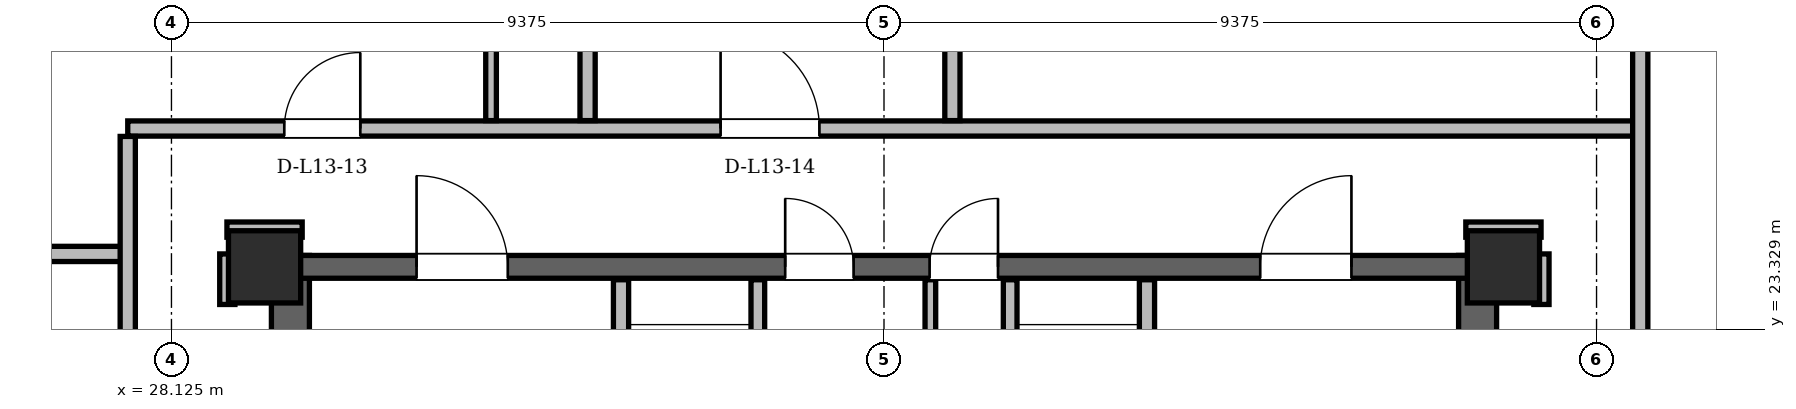
"""IFC4 building model, lengths in metres.
Left out: names, types, materials, properties, quantities, classifications, styles, units other than length and angle.
Written with IfcOpenShell. Run it as: python <this file> out.ifc"""

import sys

from ifc_helpers import new_model, si_unit, direction, frame, frame_2d, origin, origin_2d, place, context, subcontext, project, spatial, rectangle, hollow_rectangle, extrude, element, fill, save


model = new_model("IFC4")
c1 = context("Model", 3, precision=1e-05, world=origin(), true_north=direction((0.0, 1.0)))
c2 = subcontext(c1, "Body", "Model", "MODEL_VIEW")
j1 = project(units=[si_unit("LENGTHUNIT", "METRE"), si_unit("PLANEANGLEUNIT", "RADIAN")], contexts=[c1])
p1 = place(None, origin())
s1 = spatial("IfcSite", under=j1, at=p1, CompositionType="ELEMENT")
p2 = place(p1, origin())
s2 = spatial("IfcBuilding", under=s1, at=p2, CompositionType="ELEMENT")
p3 = place(p2, frame((0.0, 0.0, 52.5)))
s3 = spatial("IfcBuildingStorey", under=s2, at=p3, CompositionType="ELEMENT", Elevation=52.5)
for number, where, z_axis, x_axis in (
    (1, (45.65, 24.15, 0.0), (0.0, 0.0, 1.0), (1.0, 0.0, 0.0)),
    (2, (29.35, 24.15, 0.0), (0.0, 0.0, 1.0), (1.0, 0.0, 0.0)),
):
    element("IfcColumn", number, at=place(p3, frame(where, z_axis=z_axis, x_axis=x_axis)), inside=s3, PredefinedType="COLUMN", context=c2, shape_type="SweptSolid", body=[
        extrude(hollow_rectangle(XDim=0.95, YDim=0.95, WallThickness=0.08, at=origin_2d()), origin(), (0.0, 0.0, 1.0), 3.6),
    ])
for number, where, z_axis, x_axis in (
    (3, (29.69, 11.0, 0.0), (0.0, 0.0, 1.0), (0.0, 1.0, 0.0)),
    (4, (45.31, 11.0, 0.0), (0.0, 0.0, 1.0), (0.0, 1.0, 0.0)),
):
    element("IfcWall", number, at=place(p3, frame(where, z_axis=z_axis, x_axis=x_axis)), inside=s3, PredefinedType="SHEAR", context=c2, shape_type="SweptSolid", body=[
        extrude(rectangle(XDim=13.3, YDim=0.5, at=frame_2d((6.65, 0.0))), origin(), (0.0, 0.0, 1.0), 3.36),
    ])
p4 = place(p3, frame((29.65, 24.15, 0.0), z_axis=(0.0, 0.0, 1.0), x_axis=(1.0, 0.0, 0.0)))
e5 = element("IfcWall", 5, at=p4, inside=s3, PredefinedType="SHEAR", context=c2, shape_type="SweptSolid", body=[
    extrude(rectangle(XDim=15.7, YDim=0.3, at=frame_2d((7.85, 0.0))), origin(), (0.0, 0.0, 1.0), 3.36),
])
p5 = place(p4, frame((1.7, 0.0, 0.0)))
e6 = element("IfcOpeningElement", 6, at=p5, cuts=e5, PredefinedType="OPENING", context=c2, shape_type="SweptSolid", body=[
    extrude(rectangle(XDim=1.2, YDim=2.2, at=frame_2d((0.6, 1.1))), frame((0.0, 0.15, 0.0), z_axis=(0.0, -1.0, 0.0), x_axis=(1.0, 0.0, 0.0)), (0.0, 0.0, 1.0), 0.3),
])
p6 = place(p4, frame((12.8, 0.0, 0.0)))
e7 = element("IfcOpeningElement", 7, at=p6, cuts=e5, PredefinedType="OPENING", context=c2, shape_type="SweptSolid", body=[
    extrude(rectangle(XDim=1.2, YDim=2.2, at=frame_2d((0.6, 1.1))), frame((0.0, 0.15, 0.0), z_axis=(0.0, -1.0, 0.0), x_axis=(1.0, 0.0, 0.0)), (0.0, 0.0, 1.0), 0.3),
])
p7 = place(p4, frame((6.55, 0.0, 0.0)))
e8 = element("IfcOpeningElement", 8, at=p7, cuts=e5, PredefinedType="OPENING", context=c2, shape_type="SweptSolid", body=[
    extrude(rectangle(XDim=0.9, YDim=2.05, at=frame_2d((0.45, 1.025))), frame((0.0, 0.15, 0.0), z_axis=(0.0, -1.0, 0.0), x_axis=(1.0, 0.0, 0.0)), (0.0, 0.0, 1.0), 0.3),
])
p8 = place(p4, frame((8.45, 0.0, 0.0)))
e9 = element("IfcOpeningElement", 9, at=p8, cuts=e5, PredefinedType="OPENING", context=c2, shape_type="SweptSolid", body=[
    extrude(rectangle(XDim=0.9, YDim=2.05, at=frame_2d((0.45, 1.025))), frame((0.0, 0.15, 0.0), z_axis=(0.0, -1.0, 0.0), x_axis=(1.0, 0.0, 0.0)), (0.0, 0.0, 1.0), 0.3),
])
p9 = place(p3, frame((61.458, 14.648, 0.0), z_axis=(0.0, 0.0, 1.0), x_axis=(-0.500001264705, 0.866024673605, 0.0)))
e10 = element("IfcWall", 10, at=p9, inside=s3, PredefinedType="SOLIDWALL", context=c2, shape_type="SweptSolid", body=[
    extrude(rectangle(XDim=33.402, YDim=0.34, at=frame_2d((16.701, 0.0))), origin(), (0.0, 0.0, 1.0), 2.494),
])
p10 = place(p9, frame((7.615, 0.0, 0.0)))
e11 = element("IfcOpeningElement", 11, at=p10, cuts=e10, PredefinedType="OPENING", context=c2, shape_type="SweptSolid", body=[
    extrude(rectangle(XDim=1.5, YDim=2.2, at=frame_2d((0.75, 1.1))), frame((0.0, 0.17, 0.0), z_axis=(0.0, -1.0, 0.0), x_axis=(1.0, 0.0, 0.0)), (0.0, 0.0, 1.0), 0.34),
])
p11 = place(p9, frame((24.692, 0.0, 0.0)))
e12 = element("IfcOpeningElement", 12, at=p11, cuts=e10, PredefinedType="OPENING", context=c2, shape_type="SweptSolid", body=[
    extrude(rectangle(XDim=1.5, YDim=2.2, at=frame_2d((0.75, 1.1))), frame((0.0, 0.17, 0.0), z_axis=(0.0, -1.0, 0.0), x_axis=(1.0, 0.0, 0.0)), (0.0, 0.0, 1.0), 0.34),
])
p12 = place(p9, frame((0.899, 0.0, 0.85)))
e13 = element("IfcOpeningElement", 13, at=p12, cuts=e10, PredefinedType="OPENING", context=c2, shape_type="SweptSolid", body=[
    extrude(rectangle(XDim=1.2, YDim=1.48, at=frame_2d((0.6, 0.74))), frame((0.0, 0.17, 0.0), z_axis=(0.0, -1.0, 0.0), x_axis=(1.0, 0.0, 0.0)), (0.0, 0.0, 1.0), 0.34),
])
p13 = place(p9, frame((10.882, 0.0, 0.85)))
e14 = element("IfcOpeningElement", 14, at=p13, cuts=e10, PredefinedType="OPENING", context=c2, shape_type="SweptSolid", body=[
    extrude(rectangle(XDim=1.6, YDim=1.534, at=frame_2d((0.8, 0.767))), frame((0.0, 0.17, 0.0), z_axis=(0.0, -1.0, 0.0), x_axis=(1.0, 0.0, 0.0)), (0.0, 0.0, 1.0), 0.34),
])
p14 = place(p9, frame((18.551, 0.0, 0.85)))
e15 = element("IfcOpeningElement", 15, at=p14, cuts=e10, PredefinedType="OPENING", context=c2, shape_type="SweptSolid", body=[
    extrude(rectangle(XDim=3.0, YDim=1.534, at=frame_2d((1.5, 0.767))), frame((0.0, 0.17, 0.0), z_axis=(0.0, -1.0, 0.0), x_axis=(1.0, 0.0, 0.0)), (0.0, 0.0, 1.0), 0.34),
])
p15 = place(p9, frame((3.059, 0.0, 0.85)))
e16 = element("IfcOpeningElement", 16, at=p15, cuts=e10, PredefinedType="OPENING", context=c2, shape_type="SweptSolid", body=[
    extrude(rectangle(XDim=1.2, YDim=1.48, at=frame_2d((0.6, 0.74))), frame((0.0, 0.17, 0.0), z_axis=(0.0, -1.0, 0.0), x_axis=(1.0, 0.0, 0.0)), (0.0, 0.0, 1.0), 0.34),
])
p16 = place(p3, frame((30.243, 43.574, 0.0), z_axis=(0.0, 0.0, 1.0), x_axis=(-0.500001264705, -0.866024673605, 0.0)))
e17 = element("IfcWall", 17, at=p16, inside=s3, PredefinedType="SOLIDWALL", context=c2, shape_type="SweptSolid", body=[
    extrude(rectangle(XDim=33.402, YDim=0.34, at=frame_2d((16.701, 0.0))), origin(), (0.0, 0.0, 1.0), 2.494),
])
p17 = place(p16, frame((7.615, 0.0, 0.0)))
e18 = element("IfcOpeningElement", 18, at=p17, cuts=e17, PredefinedType="OPENING", context=c2, shape_type="SweptSolid", body=[
    extrude(rectangle(XDim=1.5, YDim=2.2, at=frame_2d((0.75, 1.1))), frame((0.0, 0.17, 0.0), z_axis=(0.0, -1.0, 0.0), x_axis=(1.0, 0.0, 0.0)), (0.0, 0.0, 1.0), 0.34),
])
p18 = place(p16, frame((25.742, 0.0, 0.0)))
e19 = element("IfcOpeningElement", 19, at=p18, cuts=e17, PredefinedType="OPENING", context=c2, shape_type="SweptSolid", body=[
    extrude(rectangle(XDim=1.5, YDim=2.2, at=frame_2d((0.75, 1.1))), frame((0.0, 0.17, 0.0), z_axis=(0.0, -1.0, 0.0), x_axis=(1.0, 0.0, 0.0)), (0.0, 0.0, 1.0), 0.34),
])
p19 = place(p16, frame((29.807, 0.0, 0.85)))
e20 = element("IfcOpeningElement", 20, at=p19, cuts=e17, PredefinedType="OPENING", context=c2, shape_type="SweptSolid", body=[
    extrude(rectangle(XDim=2.2, YDim=1.534, at=frame_2d((1.1, 0.767))), frame((0.0, 0.17, 0.0), z_axis=(0.0, -1.0, 0.0), x_axis=(1.0, 0.0, 0.0)), (0.0, 0.0, 1.0), 0.34),
])
p20 = place(p16, frame((1.321, 0.0, 0.85)))
e21 = element("IfcOpeningElement", 21, at=p20, cuts=e17, PredefinedType="OPENING", context=c2, shape_type="SweptSolid", body=[
    extrude(rectangle(XDim=2.6, YDim=1.534, at=frame_2d((1.3, 0.767))), frame((0.0, 0.17, 0.0), z_axis=(0.0, -1.0, 0.0), x_axis=(1.0, 0.0, 0.0)), (0.0, 0.0, 1.0), 0.34),
])
p21 = place(p16, frame((16.814, 0.0, 0.85)))
e22 = element("IfcOpeningElement", 22, at=p21, cuts=e17, PredefinedType="OPENING", context=c2, shape_type="SweptSolid", body=[
    extrude(rectangle(XDim=2.0, YDim=1.534, at=frame_2d((1.0, 0.767))), frame((0.0, 0.17, 0.0), z_axis=(0.0, -1.0, 0.0), x_axis=(1.0, 0.0, 0.0)), (0.0, 0.0, 1.0), 0.34),
])
p22 = place(p3, frame((34.04, 19.48, 0.0), z_axis=(0.0, 0.0, 1.0), x_axis=(0.0, 1.0, 0.0)))
e23 = element("IfcWall", 23, at=p22, inside=s3, PredefinedType="PARTITIONING", context=c2, shape_type="SweptSolid", body=[
    extrude(rectangle(XDim=4.5, YDim=0.2, at=frame_2d((2.25, 0.0))), origin(), (0.0, 0.0, 1.0), 2.4),
])
p23 = place(p22, frame((2.12, 0.0, 0.0)))
e24 = element("IfcOpeningElement", 24, at=p23, cuts=e23, PredefinedType="OPENING", context=c2, shape_type="SweptSolid", body=[
    extrude(rectangle(XDim=1.1, YDim=2.2, at=frame_2d((0.55, 1.1))), frame((0.0, 0.1, 0.0), z_axis=(0.0, -1.0, 0.0), x_axis=(1.0, 0.0, 0.0)), (0.0, 0.0, 1.0), 0.2),
])
p24 = place(p3, frame((35.84, 20.96, 0.0), z_axis=(0.0, 0.0, 1.0), x_axis=(0.0, 1.0, 0.0)))
e25 = element("IfcWall", 25, at=p24, inside=s3, PredefinedType="PARTITIONING", context=c2, shape_type="SweptSolid", body=[
    extrude(rectangle(XDim=3.02, YDim=0.18, at=frame_2d((1.51, 0.0))), origin(), (0.0, 0.0, 1.0), 2.4),
])
p25 = place(p3, frame((40.96, 19.48, 0.0), z_axis=(0.0, 0.0, 1.0), x_axis=(0.0, 1.0, 0.0)))
e26 = element("IfcWall", 26, at=p25, inside=s3, PredefinedType="PARTITIONING", context=c2, shape_type="SweptSolid", body=[
    extrude(rectangle(XDim=4.5, YDim=0.2, at=frame_2d((2.25, 0.0))), origin(), (0.0, 0.0, 1.0), 2.4),
])
p26 = place(p25, frame((2.12, 0.0, 0.0)))
e27 = element("IfcOpeningElement", 27, at=p26, cuts=e26, PredefinedType="OPENING", context=c2, shape_type="SweptSolid", body=[
    extrude(rectangle(XDim=1.1, YDim=2.2, at=frame_2d((0.55, 1.1))), frame((0.0, 0.1, 0.0), z_axis=(0.0, -1.0, 0.0), x_axis=(1.0, 0.0, 0.0)), (0.0, 0.0, 1.0), 0.2),
])
p27 = place(p3, frame((39.16, 20.96, 0.0), z_axis=(0.0, 0.0, 1.0), x_axis=(0.0, 1.0, 0.0)))
e28 = element("IfcWall", 28, at=p27, inside=s3, PredefinedType="PARTITIONING", context=c2, shape_type="SweptSolid", body=[
    extrude(rectangle(XDim=3.02, YDim=0.18, at=frame_2d((1.51, 0.0))), origin(), (0.0, 0.0, 1.0), 2.4),
])
p28 = place(p3, frame((38.11, 21.06, 0.0), z_axis=(0.0, 0.0, 1.0), x_axis=(0.0, 1.0, 0.0)))
e29 = element("IfcWall", 29, at=p28, inside=s3, PredefinedType="PARTITIONING", context=c2, shape_type="SweptSolid", body=[
    extrude(rectangle(XDim=2.92, YDim=0.14, at=frame_2d((1.46, 0.0))), origin(), (0.0, 0.0, 1.0), 2.4),
])
p29 = place(p3, frame((19.327, 24.32, 0.0), z_axis=(0.0, 0.0, 1.0), x_axis=(1.0, 0.0, 0.0)))
e30 = element("IfcWall", 30, at=p29, inside=s3, PredefinedType="PARTITIONING", context=c2, shape_type="SweptSolid", body=[
    extrude(rectangle(XDim=8.223, YDim=0.2, at=frame_2d((4.112, 0.0))), origin(), (0.0, 0.0, 1.0), 2.494),
])
for number, where, z_axis, x_axis in (
    (31, (28.855, 24.64, 0.0), (0.0, 0.0, 1.0), (1.0, 0.0, 0.0)),
    (32, (45.155, 24.64, 0.0), (0.0, 0.0, 1.0), (1.0, 0.0, 0.0)),
):
    element("IfcWall", number, at=place(p3, frame(where, z_axis=z_axis, x_axis=x_axis)), inside=s3, PredefinedType="PARTITIONING", context=c2, shape_type="SweptSolid", body=[
        extrude(rectangle(XDim=0.99, YDim=0.2, at=frame_2d((0.495, 0.0))), origin(), (0.0, 0.0, 1.0), 2.738),
    ])
p30 = place(p3, frame((27.55, 25.97, 0.0), z_axis=(0.0, 0.0, 1.0), x_axis=(1.0, 0.0, 0.0)))
e33 = element("IfcWall", 33, at=p30, inside=s3, PredefinedType="PARTITIONING", context=c2, shape_type="SweptSolid", body=[
    extrude(rectangle(XDim=19.9, YDim=0.2, at=frame_2d((9.95, 0.0))), origin(), (0.0, 0.0, 1.0), 2.738),
])
p31 = place(p30, frame((2.06, 0.0, 0.0)))
e34 = element("IfcOpeningElement", 34, at=p31, cuts=e33, PredefinedType="OPENING", context=c2, shape_type="SweptSolid", body=[
    extrude(rectangle(XDim=1.0, YDim=2.18, at=frame_2d((0.5, 1.09))), frame((0.0, 0.1, 0.0), z_axis=(0.0, -1.0, 0.0), x_axis=(1.0, 0.0, 0.0)), (0.0, 0.0, 1.0), 0.2),
])
p32 = place(p30, frame((7.8, 0.0, 0.0)))
e35 = element("IfcOpeningElement", 35, at=p32, cuts=e33, PredefinedType="OPENING", context=c2, shape_type="SweptSolid", body=[
    extrude(rectangle(XDim=1.3, YDim=2.2, at=frame_2d((0.65, 1.1))), frame((0.0, 0.1, 0.0), z_axis=(0.0, -1.0, 0.0), x_axis=(1.0, 0.0, 0.0)), (0.0, 0.0, 1.0), 0.2),
])
p33 = place(p3, frame((27.55, 11.054, 0.0), z_axis=(0.0, 0.0, 1.0), x_axis=(0.0, 1.0, 0.0)))
e36 = element("IfcWall", 36, at=p33, inside=s3, PredefinedType="PARTITIONING", context=c2, shape_type="SweptSolid", body=[
    extrude(rectangle(XDim=14.812, YDim=0.2, at=frame_2d((7.406, 0.0))), origin(), (0.0, 0.0, 1.0), 2.738),
])
p34 = place(p33, frame((7.932, 0.0, 0.0)))
e37 = element("IfcOpeningElement", 37, at=p34, cuts=e36, PredefinedType="OPENING", context=c2, shape_type="SweptSolid", body=[
    extrude(rectangle(XDim=1.0, YDim=2.18, at=frame_2d((0.5, 1.09))), frame((0.0, 0.1, 0.0), z_axis=(0.0, -1.0, 0.0), x_axis=(1.0, 0.0, 0.0)), (0.0, 0.0, 1.0), 0.2),
])
p35 = place(p3, frame((28.86, 23.655, 0.0), z_axis=(0.0, 0.0, 1.0), x_axis=(0.0, 1.0, 0.0)))
e38 = element("IfcWall", 38, at=p35, inside=s3, PredefinedType="PARTITIONING", context=c2, shape_type="SweptSolid", body=[
    extrude(rectangle(XDim=0.665, YDim=0.2, at=frame_2d((0.333, 0.0))), origin(), (0.0, 0.0, 1.0), 2.946),
])
p36 = place(p3, frame((32.33, 26.074, 0.0), z_axis=(0.0, 0.0, 1.0), x_axis=(0.0, 1.0, 0.0)))
e39 = element("IfcWall", 39, at=p36, inside=s3, PredefinedType="PARTITIONING", context=c2, shape_type="SweptSolid", body=[
    extrude(rectangle(XDim=17.326, YDim=0.14, at=frame_2d((8.663, 0.0))), origin(), (0.0, 0.0, 1.0), 3.36),
])
p37 = place(p36, frame((1.423, 0.0, 0.0)))
e40 = element("IfcOpeningElement", 40, at=p37, cuts=e39, PredefinedType="OPENING", context=c2, shape_type="SweptSolid", body=[
    extrude(rectangle(XDim=0.95, YDim=2.1, at=frame_2d((0.475, 1.05))), frame((0.0, 0.07, 0.0), z_axis=(0.0, -1.0, 0.0), x_axis=(1.0, 0.0, 0.0)), (0.0, 0.0, 1.0), 0.14),
])
p38 = place(p36, frame((5.365, 0.0, 0.0)))
e41 = element("IfcOpeningElement", 41, at=p38, cuts=e39, PredefinedType="OPENING", context=c2, shape_type="SweptSolid", body=[
    extrude(rectangle(XDim=0.92, YDim=2.12, at=frame_2d((0.46, 1.06))), frame((0.0, 0.07, 0.0), z_axis=(0.0, -1.0, 0.0), x_axis=(1.0, 0.0, 0.0)), (0.0, 0.0, 1.0), 0.14),
])
p39 = place(p36, frame((8.737, 0.0, 0.0)))
e42 = element("IfcOpeningElement", 42, at=p39, cuts=e39, PredefinedType="OPENING", context=c2, shape_type="SweptSolid", body=[
    extrude(rectangle(XDim=0.95, YDim=2.1, at=frame_2d((0.475, 1.05))), frame((0.0, 0.07, 0.0), z_axis=(0.0, -1.0, 0.0), x_axis=(1.0, 0.0, 0.0)), (0.0, 0.0, 1.0), 0.14),
])
p40 = place(p36, frame((11.581, 0.0, 0.0)))
e43 = element("IfcOpeningElement", 43, at=p40, cuts=e39, PredefinedType="OPENING", context=c2, shape_type="SweptSolid", body=[
    extrude(rectangle(XDim=0.95, YDim=2.1, at=frame_2d((0.475, 1.05))), frame((0.0, 0.07, 0.0), z_axis=(0.0, -1.0, 0.0), x_axis=(1.0, 0.0, 0.0)), (0.0, 0.0, 1.0), 0.14),
])
p41 = place(p36, frame((13.96, 0.0, 0.0)))
e44 = element("IfcOpeningElement", 44, at=p41, cuts=e39, PredefinedType="OPENING", context=c2, shape_type="SweptSolid", body=[
    extrude(rectangle(XDim=0.95, YDim=2.1, at=frame_2d((0.475, 1.05))), frame((0.0, 0.07, 0.0), z_axis=(0.0, -1.0, 0.0), x_axis=(1.0, 0.0, 0.0)), (0.0, 0.0, 1.0), 0.14),
])
p42 = place(p36, frame((15.98, 0.0, 0.0)))
e45 = element("IfcOpeningElement", 45, at=p42, cuts=e39, PredefinedType="OPENING", context=c2, shape_type="SweptSolid", body=[
    extrude(rectangle(XDim=0.88, YDim=2.08, at=frame_2d((0.44, 1.04))), frame((0.0, 0.07, 0.0), z_axis=(0.0, -1.0, 0.0), x_axis=(1.0, 0.0, 0.0)), (0.0, 0.0, 1.0), 0.14),
])
for number, where, z_axis, x_axis in (
    (46, (33.6, 26.074, 0.0), (0.0, 0.0, 1.0), (0.0, 1.0, 0.0)),
    (47, (38.4, 26.074, 0.0), (0.0, 0.0, 1.0), (0.0, 1.0, 0.0)),
):
    element("IfcWall", number, at=place(p3, frame(where, z_axis=z_axis, x_axis=x_axis)), inside=s3, PredefinedType="PARTITIONING", context=c2, shape_type="SweptSolid", body=[
        extrude(rectangle(XDim=4.292, YDim=0.2, at=frame_2d((2.146, 0.0))), origin(), (0.0, 0.0, 1.0), 3.36),
    ])
p43 = place(p3, frame((46.15, 23.655, 0.0), z_axis=(0.0, 0.0, 1.0), x_axis=(0.0, 1.0, 0.0)))
e48 = element("IfcWall", 48, at=p43, inside=s3, PredefinedType="PARTITIONING", context=c2, shape_type="SweptSolid", body=[
    extrude(rectangle(XDim=0.665, YDim=0.2, at=frame_2d((0.333, 0.0))), origin(), (0.0, 0.0, 1.0), 2.946),
])
p44 = place(p3, frame((47.45, 11.054, 0.0), z_axis=(0.0, 0.0, 1.0), x_axis=(0.0, 1.0, 0.0)))
e49 = element("IfcWall", 49, at=p44, inside=s3, PredefinedType="PARTITIONING", context=c2, shape_type="SweptSolid", body=[
    extrude(rectangle(XDim=27.509, YDim=0.2, at=frame_2d((13.754, 0.0))), origin(), (0.0, 0.0, 1.0), 2.494),
])
p45 = place(p44, frame((10.989, 0.0, 0.0)))
e50 = element("IfcOpeningElement", 50, at=p45, cuts=e49, PredefinedType="OPENING", context=c2, shape_type="SweptSolid", body=[
    extrude(rectangle(XDim=1.0, YDim=2.18, at=frame_2d((0.5, 1.09))), frame((0.0, 0.1, 0.0), z_axis=(0.0, -1.0, 0.0), x_axis=(1.0, 0.0, 0.0)), (0.0, 0.0, 1.0), 0.2),
])
p46 = place(p5, origin())
e51 = element("IfcDoor", 51, at=p46, inside=s3, OperationType="SINGLE_SWING_LEFT", PredefinedType="DOOR", context=c2, shape_type="SweptSolid", body=[
    extrude(rectangle(XDim=1.2, YDim=2.2, at=frame_2d((0.6, 1.1))), frame((0.0, 0.025, 0.0), z_axis=(0.0, -1.0, 0.0), x_axis=(1.0, 0.0, 0.0)), (0.0, 0.0, 1.0), 0.05),
])
fill(e6, e51)
p47 = place(p6, origin())
e52 = element("IfcDoor", 52, at=p47, inside=s3, OperationType="SINGLE_SWING_RIGHT", PredefinedType="DOOR", context=c2, shape_type="SweptSolid", body=[
    extrude(rectangle(XDim=1.2, YDim=2.2, at=frame_2d((0.6, 1.1))), frame((0.0, 0.025, 0.0), z_axis=(0.0, -1.0, 0.0), x_axis=(1.0, 0.0, 0.0)), (0.0, 0.0, 1.0), 0.05),
])
fill(e7, e52)
p48 = place(p7, origin())
e53 = element("IfcDoor", 53, at=p48, inside=s3, OperationType="SINGLE_SWING_LEFT", PredefinedType="DOOR", context=c2, shape_type="SweptSolid", body=[
    extrude(rectangle(XDim=0.9, YDim=2.05, at=frame_2d((0.45, 1.025))), frame((0.0, 0.025, 0.0), z_axis=(0.0, -1.0, 0.0), x_axis=(1.0, 0.0, 0.0)), (0.0, 0.0, 1.0), 0.05),
])
fill(e8, e53)
p49 = place(p8, origin())
e54 = element("IfcDoor", 54, at=p49, inside=s3, OperationType="SINGLE_SWING_RIGHT", PredefinedType="DOOR", context=c2, shape_type="SweptSolid", body=[
    extrude(rectangle(XDim=0.9, YDim=2.05, at=frame_2d((0.45, 1.025))), frame((0.0, 0.025, 0.0), z_axis=(0.0, -1.0, 0.0), x_axis=(1.0, 0.0, 0.0)), (0.0, 0.0, 1.0), 0.05),
])
fill(e9, e54)
p50 = place(p31, origin())
e55 = element("IfcDoor", 55, at=p50, inside=s3, OperationType="SINGLE_SWING_RIGHT", PredefinedType="DOOR", context=c2, shape_type="SweptSolid", body=[
    extrude(rectangle(XDim=1.0, YDim=2.18, at=frame_2d((0.5, 1.09))), frame((0.0, 0.025, 0.0), z_axis=(0.0, -1.0, 0.0), x_axis=(1.0, 0.0, 0.0)), (0.0, 0.0, 1.0), 0.05),
])
fill(e34, e55)
p51 = place(p32, origin())
e56 = element("IfcDoor", 56, at=p51, inside=s3, OperationType="SINGLE_SWING_LEFT", PredefinedType="DOOR", context=c2, shape_type="SweptSolid", body=[
    extrude(rectangle(XDim=1.3, YDim=2.2, at=frame_2d((0.65, 1.1))), frame((0.0, 0.025, 0.0), z_axis=(0.0, -1.0, 0.0), x_axis=(1.0, 0.0, 0.0)), (0.0, 0.0, 1.0), 0.05),
])
fill(e35, e56)
save(model, sys.argv[1])
